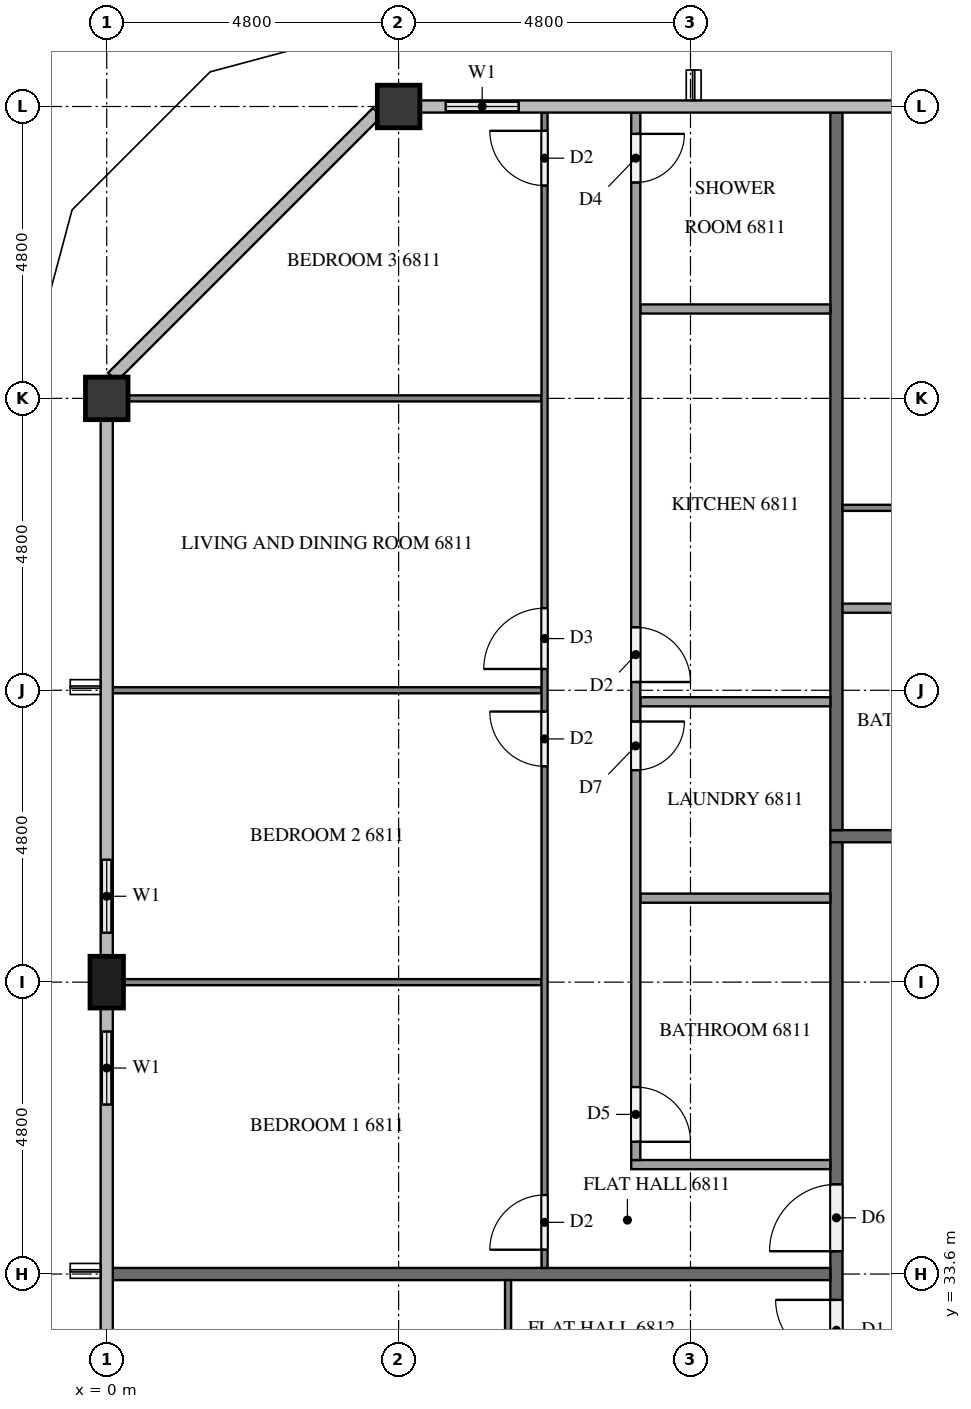
"""IFC4 building model, lengths in metres.
Left out: names, types, materials, properties, quantities, classifications, styles, units other than length and angle.
Written with IfcOpenShell. Run it as: python <this file> out.ifc"""

import sys

from ifc_helpers import new_model, si_unit, direction, frame, frame_2d, origin, origin_2d, place, context, subcontext, project, spatial, rectangle, extrude, element, fill, save


model = new_model("IFC4")
c1 = context("Model", 3, precision=1e-05, world=origin(), true_north=direction((0.0, 1.0)))
c2 = subcontext(c1, "Body", "Model", "MODEL_VIEW")
j1 = project(units=[si_unit("LENGTHUNIT", "METRE"), si_unit("PLANEANGLEUNIT", "RADIAN")], contexts=[c1])
p1 = place(None, origin())
s1 = spatial("IfcSite", under=j1, at=p1, CompositionType="ELEMENT")
p2 = place(p1, origin())
s2 = spatial("IfcBuilding", under=s1, at=p2, CompositionType="ELEMENT")
p3 = place(p2, frame((0.0, 0.0, 259.7)))
s3 = spatial("IfcBuildingStorey", under=s2, at=p3, CompositionType="ELEMENT", Elevation=259.7)
for number, where, z_axis, x_axis in (
    (1, (4.8, 52.8, 0.0), (0.0, 0.0, 1.0), (1.0, 0.0, 0.0)),
    (2, (0.0, 48.0, 0.0), (0.0, 0.0, 1.0), (1.0, 0.0, 0.0)),
):
    element("IfcColumn", number, at=place(p3, frame(where, z_axis=z_axis, x_axis=x_axis)), inside=s3, PredefinedType="COLUMN", context=c2, shape_type="SweptSolid", body=[
        extrude(rectangle(XDim=0.7, YDim=0.7, at=origin_2d()), origin(), (0.0, 0.0, 1.0), 3.1),
    ])
p4 = place(p3, frame((0.0, 38.4, 0.0), z_axis=(0.0, 0.0, 1.0), x_axis=(0.0, 1.0, 0.0)))
e3 = element("IfcColumn", 3, at=p4, inside=s3, PredefinedType="COLUMN", context=c2, shape_type="SweptSolid", body=[
    extrude(rectangle(XDim=0.85, YDim=0.55, at=origin_2d()), origin(), (0.0, 0.0, 1.0), 3.1),
])
p5 = place(p3, frame((7.2, 52.8, 0.0), z_axis=(0.0, 0.0, 1.0), x_axis=(-1.0, 0.0, 0.0)))
e4 = element("IfcWall", 4, at=p5, inside=s3, PredefinedType="SOLIDWALL", context=c2, shape_type="SweptSolid", body=[
    extrude(rectangle(XDim=2.05, YDim=0.15, at=frame_2d((1.025, 0.0))), origin(), (0.0, 0.0, 1.0), 3.1),
])
p6 = place(p5, frame((0.425, 0.0, 0.9)))
e5 = element("IfcOpeningElement", 5, at=p6, cuts=e4, PredefinedType="OPENING", context=c2, shape_type="SweptSolid", body=[
    extrude(rectangle(XDim=1.2, YDim=1.4, at=frame_2d((0.6, 0.7))), frame((0.0, 0.085, 0.0), z_axis=(0.0, -1.0, 0.0), x_axis=(1.0, 0.0, 0.0)), (0.0, 0.0, 1.0), 0.17),
])
p7 = place(p3, frame((0.0, 40.8, 0.0), z_axis=(0.0, 0.0, 1.0), x_axis=(0.0, -1.0, 0.0)))
e6 = element("IfcWall", 6, at=p7, inside=s3, PredefinedType="SOLIDWALL", context=c2, shape_type="SweptSolid", body=[
    extrude(rectangle(XDim=1.975, YDim=0.15, at=frame_2d((0.988, 0.0))), origin(), (0.0, 0.0, 1.0), 3.1),
])
p8 = place(p7, frame((0.387, 0.0, 0.9)))
e7 = element("IfcOpeningElement", 7, at=p8, cuts=e6, PredefinedType="OPENING", context=c2, shape_type="SweptSolid", body=[
    extrude(rectangle(XDim=1.2, YDim=1.4, at=frame_2d((0.6, 0.7))), frame((0.0, 0.085, 0.0), z_axis=(0.0, -1.0, 0.0), x_axis=(1.0, 0.0, 0.0)), (0.0, 0.0, 1.0), 0.17),
])
p9 = place(p3, frame((0.0, 37.975, 0.0), z_axis=(0.0, 0.0, 1.0), x_axis=(0.0, -1.0, 0.0)))
e8 = element("IfcWall", 8, at=p9, inside=s3, PredefinedType="SOLIDWALL", context=c2, shape_type="SweptSolid", body=[
    extrude(rectangle(XDim=1.975, YDim=0.15, at=frame_2d((0.988, 0.0))), origin(), (0.0, 0.0, 1.0), 3.1),
])
p10 = place(p9, frame((0.387, 0.0, 0.9)))
e9 = element("IfcOpeningElement", 9, at=p10, cuts=e8, PredefinedType="OPENING", context=c2, shape_type="SweptSolid", body=[
    extrude(rectangle(XDim=1.2, YDim=1.4, at=frame_2d((0.6, 0.7))), frame((0.0, 0.085, 0.0), z_axis=(0.0, -1.0, 0.0), x_axis=(1.0, 0.0, 0.0)), (0.0, 0.0, 1.0), 0.17),
])
p11 = place(p3, frame((11.9, 40.8, 0.0), z_axis=(0.0, 0.0, 1.0), x_axis=(1.0, 0.0, 0.0)))
e10 = element("IfcWall", 10, at=p11, inside=s3, PredefinedType="PARTITIONING", context=c2, shape_type="SweptSolid", body=[
    extrude(rectangle(XDim=38.6, YDim=0.2, at=frame_2d((19.3, 0.0))), origin(), (0.0, 0.0, 1.0), 3.1),
])
p12 = place(p11, frame((34.125, 0.0, 0.0)))
e11 = element("IfcOpeningElement", 11, at=p12, cuts=e10, PredefinedType="OPENING", context=c2, shape_type="SweptSolid", body=[
    extrude(rectangle(XDim=1.0, YDim=2.1, at=frame_2d((0.5, 1.05))), frame((0.0, 0.11, 0.0), z_axis=(0.0, -1.0, 0.0), x_axis=(1.0, 0.0, 0.0)), (0.0, 0.0, 1.0), 0.22),
])
p13 = place(p11, frame((24.525, 0.0, 0.0)))
e12 = element("IfcOpeningElement", 12, at=p13, cuts=e10, PredefinedType="OPENING", context=c2, shape_type="SweptSolid", body=[
    extrude(rectangle(XDim=1.0, YDim=2.1, at=frame_2d((0.5, 1.05))), frame((0.0, 0.11, 0.0), z_axis=(0.0, -1.0, 0.0), x_axis=(1.0, 0.0, 0.0)), (0.0, 0.0, 1.0), 0.22),
])
p14 = place(p11, frame((10.125, 0.0, 0.0)))
e13 = element("IfcOpeningElement", 13, at=p14, cuts=e10, PredefinedType="OPENING", context=c2, shape_type="SweptSolid", body=[
    extrude(rectangle(XDim=1.0, YDim=2.1, at=frame_2d((0.5, 1.05))), frame((0.0, 0.11, 0.0), z_axis=(0.0, -1.0, 0.0), x_axis=(1.0, 0.0, 0.0)), (0.0, 0.0, 1.0), 0.22),
])
p15 = place(p11, frame((8.275, 0.0, 0.0)))
e14 = element("IfcOpeningElement", 14, at=p15, cuts=e10, PredefinedType="OPENING", context=c2, shape_type="SweptSolid", body=[
    extrude(rectangle(XDim=1.0, YDim=2.1, at=frame_2d((0.5, 1.05))), frame((0.0, 0.11, 0.0), z_axis=(0.0, -1.0, 0.0), x_axis=(1.0, 0.0, 0.0)), (0.0, 0.0, 1.0), 0.22),
])
p16 = place(p3, frame((12.0, 12.1, 0.0), z_axis=(0.0, 0.0, 1.0), x_axis=(0.0, 1.0, 0.0)))
e15 = element("IfcWall", 15, at=p16, inside=s3, PredefinedType="PARTITIONING", context=c2, shape_type="SweptSolid", body=[
    extrude(rectangle(XDim=28.6, YDim=0.2, at=frame_2d((14.3, 0.0))), origin(), (0.0, 0.0, 1.0), 3.1),
])
p17 = place(p16, frame((21.875, 0.0, 0.0)))
e16 = element("IfcOpeningElement", 16, at=p17, cuts=e15, PredefinedType="OPENING", context=c2, shape_type="SweptSolid", body=[
    extrude(rectangle(XDim=1.1, YDim=2.1, at=frame_2d((0.55, 1.05))), frame((0.0, 0.11, 0.0), z_axis=(0.0, -1.0, 0.0), x_axis=(1.0, 0.0, 0.0)), (0.0, 0.0, 1.0), 0.22),
])
p18 = place(p16, frame((20.075, 0.0, 0.0)))
e17 = element("IfcOpeningElement", 17, at=p18, cuts=e15, PredefinedType="OPENING", context=c2, shape_type="SweptSolid", body=[
    extrude(rectangle(XDim=1.0, YDim=2.1, at=frame_2d((0.5, 1.05))), frame((0.0, 0.11, 0.0), z_axis=(0.0, -1.0, 0.0), x_axis=(1.0, 0.0, 0.0)), (0.0, 0.0, 1.0), 0.22),
])
p19 = place(p16, frame((5.675, 0.0, 0.0)))
e18 = element("IfcOpeningElement", 18, at=p19, cuts=e15, PredefinedType="OPENING", context=c2, shape_type="SweptSolid", body=[
    extrude(rectangle(XDim=1.0, YDim=2.1, at=frame_2d((0.5, 1.05))), frame((0.0, 0.11, 0.0), z_axis=(0.0, -1.0, 0.0), x_axis=(1.0, 0.0, 0.0)), (0.0, 0.0, 1.0), 0.22),
])
p20 = place(p3, frame((12.0, 52.7, 0.0), z_axis=(0.0, 0.0, 1.0), x_axis=(0.0, -1.0, 0.0)))
e19 = element("IfcWall", 19, at=p20, inside=s3, PredefinedType="PARTITIONING", context=c2, shape_type="SweptSolid", body=[
    extrude(rectangle(XDim=11.8, YDim=0.2, at=frame_2d((5.9, 0.0))), origin(), (0.0, 0.0, 1.0), 3.1),
])
p21 = place(p3, frame((0.1, 33.6, 0.0), z_axis=(0.0, 0.0, 1.0), x_axis=(1.0, 0.0, 0.0)))
e20 = element("IfcWall", 20, at=p21, inside=s3, PredefinedType="PARTITIONING", context=c2, shape_type="SweptSolid", body=[
    extrude(rectangle(XDim=11.8, YDim=0.2, at=frame_2d((5.9, 0.0))), origin(), (0.0, 0.0, 1.0), 3.1),
])
p22 = place(p3, frame((12.1, 46.2, 0.0), z_axis=(0.0, 0.0, 1.0), x_axis=(1.0, 0.0, 0.0)))
e21 = element("IfcWall", 21, at=p22, inside=s3, PredefinedType="PARTITIONING", context=c2, shape_type="SweptSolid", body=[
    extrude(rectangle(XDim=9.4, YDim=0.1, at=frame_2d((4.7, 0.0))), origin(), (0.0, 0.0, 1.0), 3.1),
])
p23 = place(p22, frame((5.05, 0.0, 0.0)))
e22 = element("IfcOpeningElement", 22, at=p23, cuts=e21, PredefinedType="OPENING", context=c2, shape_type="SweptSolid", body=[
    extrude(rectangle(XDim=1.0, YDim=2.1, at=frame_2d((0.5, 1.05))), frame((0.0, 0.06, 0.0), z_axis=(0.0, -1.0, 0.0), x_axis=(1.0, 0.0, 0.0)), (0.0, 0.0, 1.0), 0.12),
])
p24 = place(p22, frame((3.45, 0.0, 0.0)))
e23 = element("IfcOpeningElement", 23, at=p24, cuts=e21, PredefinedType="OPENING", context=c2, shape_type="SweptSolid", body=[
    extrude(rectangle(XDim=0.9, YDim=2.1, at=frame_2d((0.45, 1.05))), frame((0.0, 0.06, 0.0), z_axis=(0.0, -1.0, 0.0), x_axis=(1.0, 0.0, 0.0)), (0.0, 0.0, 1.0), 0.12),
])
p25 = place(p3, frame((19.725, 44.55, 0.0), z_axis=(0.0, 0.0, 1.0), x_axis=(-1.0, 0.0, 0.0)))
e24 = element("IfcWall", 24, at=p25, inside=s3, PredefinedType="PARTITIONING", context=c2, shape_type="SweptSolid", body=[
    extrude(rectangle(XDim=7.625, YDim=0.15, at=frame_2d((3.812, 0.0))), origin(), (0.0, 0.0, 1.0), 3.1),
])
p26 = place(p25, frame((3.35, 0.0, 0.0)))
e25 = element("IfcOpeningElement", 25, at=p26, cuts=e24, PredefinedType="OPENING", context=c2, shape_type="SweptSolid", body=[
    extrude(rectangle(XDim=0.9, YDim=2.1, at=frame_2d((0.45, 1.05))), frame((0.0, 0.085, 0.0), z_axis=(0.0, -1.0, 0.0), x_axis=(1.0, 0.0, 0.0)), (0.0, 0.0, 1.0), 0.17),
])
p27 = place(p25, frame((4.9, 0.0, 0.0)))
e26 = element("IfcOpeningElement", 26, at=p27, cuts=e24, PredefinedType="OPENING", context=c2, shape_type="SweptSolid", body=[
    extrude(rectangle(XDim=0.8, YDim=2.1, at=frame_2d((0.4, 1.05))), frame((0.0, 0.085, 0.0), z_axis=(0.0, -1.0, 0.0), x_axis=(1.0, 0.0, 0.0)), (0.0, 0.0, 1.0), 0.17),
])
p28 = place(p3, frame((7.15, 38.4, 0.0), z_axis=(0.0, 0.0, 1.0), x_axis=(-1.0, 0.0, 0.0)))
e27 = element("IfcWall", 27, at=p28, inside=s3, PredefinedType="PARTITIONING", context=c2, shape_type="SweptSolid", body=[
    extrude(rectangle(XDim=6.875, YDim=0.1, at=frame_2d((3.438, 0.0))), origin(), (0.0, 0.0, 1.0), 3.1),
])
p29 = place(p3, frame((7.15, 43.2, 0.0), z_axis=(0.0, 0.0, 1.0), x_axis=(-1.0, 0.0, 0.0)))
e28 = element("IfcWall", 28, at=p29, inside=s3, PredefinedType="PARTITIONING", context=c2, shape_type="SweptSolid", body=[
    extrude(rectangle(XDim=7.05, YDim=0.1, at=frame_2d((3.525, 0.0))), origin(), (0.0, 0.0, 1.0), 3.1),
])
p30 = place(p3, frame((7.15, 48.0, 0.0), z_axis=(0.0, 0.0, 1.0), x_axis=(-1.0, 0.0, 0.0)))
e29 = element("IfcWall", 29, at=p30, inside=s3, PredefinedType="PARTITIONING", context=c2, shape_type="SweptSolid", body=[
    extrude(rectangle(XDim=6.8, YDim=0.1, at=frame_2d((3.4, 0.0))), origin(), (0.0, 0.0, 1.0), 3.1),
])
p31 = place(p3, frame((7.2, 33.7, 0.0), z_axis=(0.0, 0.0, 1.0), x_axis=(0.0, 1.0, 0.0)))
e30 = element("IfcWall", 30, at=p31, inside=s3, PredefinedType="PARTITIONING", context=c2, shape_type="SweptSolid", body=[
    extrude(rectangle(XDim=19.0, YDim=0.1, at=frame_2d((9.5, 0.0))), origin(), (0.0, 0.0, 1.0), 3.1),
])
p32 = place(p31, frame((0.3, 0.0, 0.0)))
e31 = element("IfcOpeningElement", 31, at=p32, cuts=e30, PredefinedType="OPENING", context=c2, shape_type="SweptSolid", body=[
    extrude(rectangle(XDim=0.9, YDim=2.1, at=frame_2d((0.45, 1.05))), frame((0.0, 0.06, 0.0), z_axis=(0.0, -1.0, 0.0), x_axis=(1.0, 0.0, 0.0)), (0.0, 0.0, 1.0), 0.12),
])
p33 = place(p31, frame((8.25, 0.0, 0.0)))
e32 = element("IfcOpeningElement", 32, at=p33, cuts=e30, PredefinedType="OPENING", context=c2, shape_type="SweptSolid", body=[
    extrude(rectangle(XDim=0.9, YDim=2.1, at=frame_2d((0.45, 1.05))), frame((0.0, 0.06, 0.0), z_axis=(0.0, -1.0, 0.0), x_axis=(1.0, 0.0, 0.0)), (0.0, 0.0, 1.0), 0.12),
])
p34 = place(p31, frame((9.85, 0.0, 0.0)))
e33 = element("IfcOpeningElement", 33, at=p34, cuts=e30, PredefinedType="OPENING", context=c2, shape_type="SweptSolid", body=[
    extrude(rectangle(XDim=1.0, YDim=2.1, at=frame_2d((0.5, 1.05))), frame((0.0, 0.06, 0.0), z_axis=(0.0, -1.0, 0.0), x_axis=(1.0, 0.0, 0.0)), (0.0, 0.0, 1.0), 0.12),
])
p35 = place(p31, frame((17.8, 0.0, 0.0)))
e34 = element("IfcOpeningElement", 34, at=p35, cuts=e30, PredefinedType="OPENING", context=c2, shape_type="SweptSolid", body=[
    extrude(rectangle(XDim=0.9, YDim=2.1, at=frame_2d((0.45, 1.05))), frame((0.0, 0.06, 0.0), z_axis=(0.0, -1.0, 0.0), x_axis=(1.0, 0.0, 0.0)), (0.0, 0.0, 1.0), 0.12),
])
for number, where, z_axis, x_axis in (
    (35, (11.9, 39.781, 0.0), (0.0, 0.0, 1.0), (-1.0, 0.0, 0.0)),
    (36, (11.9, 43.011, 0.0), (0.0, 0.0, 1.0), (-1.0, 0.0, 0.0)),
    (37, (11.9, 49.47, 0.0), (0.0, 0.0, 1.0), (-1.0, 0.0, 0.0)),
):
    element("IfcWall", number, at=place(p3, frame(where, z_axis=z_axis, x_axis=x_axis)), inside=s3, PredefinedType="PARTITIONING", context=c2, shape_type="SweptSolid", body=[
        extrude(rectangle(XDim=3.125, YDim=0.15, at=frame_2d((1.562, 0.0))), origin(), (0.0, 0.0, 1.0), 3.1),
    ])
p36 = place(p3, frame((11.9, 35.4, 0.0), z_axis=(0.0, 0.0, 1.0), x_axis=(-1.0, 0.0, 0.0)))
e38 = element("IfcWall", 38, at=p36, inside=s3, PredefinedType="PARTITIONING", context=c2, shape_type="SweptSolid", body=[
    extrude(rectangle(XDim=3.275, YDim=0.15, at=frame_2d((1.637, 0.0))), origin(), (0.0, 0.0, 1.0), 3.1),
])
p37 = place(p3, frame((8.7, 52.7, 0.0), z_axis=(0.0, 0.0, 1.0), x_axis=(0.0, -1.0, 0.0)))
e39 = element("IfcWall", 39, at=p37, inside=s3, PredefinedType="PARTITIONING", context=c2, shape_type="SweptSolid", body=[
    extrude(rectangle(XDim=17.225, YDim=0.15, at=frame_2d((8.612, 0.0))), origin(), (0.0, 0.0, 1.0), 3.1),
])
p38 = place(p37, frame((16.025, 0.0, 0.0)))
e40 = element("IfcOpeningElement", 40, at=p38, cuts=e39, PredefinedType="OPENING", context=c2, shape_type="SweptSolid", body=[
    extrude(rectangle(XDim=0.9, YDim=2.1, at=frame_2d((0.45, 1.05))), frame((0.0, 0.085, 0.0), z_axis=(0.0, -1.0, 0.0), x_axis=(1.0, 0.0, 0.0)), (0.0, 0.0, 1.0), 0.17),
])
p39 = place(p37, frame((10.014, 0.0, 0.0)))
e41 = element("IfcOpeningElement", 41, at=p39, cuts=e39, PredefinedType="OPENING", context=c2, shape_type="SweptSolid", body=[
    extrude(rectangle(XDim=0.8, YDim=2.1, at=frame_2d((0.4, 1.05))), frame((0.0, 0.085, 0.0), z_axis=(0.0, -1.0, 0.0), x_axis=(1.0, 0.0, 0.0)), (0.0, 0.0, 1.0), 0.17),
])
p40 = place(p37, frame((8.464, 0.0, 0.0)))
e42 = element("IfcOpeningElement", 42, at=p40, cuts=e39, PredefinedType="OPENING", context=c2, shape_type="SweptSolid", body=[
    extrude(rectangle(XDim=0.9, YDim=2.1, at=frame_2d((0.45, 1.05))), frame((0.0, 0.085, 0.0), z_axis=(0.0, -1.0, 0.0), x_axis=(1.0, 0.0, 0.0)), (0.0, 0.0, 1.0), 0.17),
])
p41 = place(p37, frame((0.35, 0.0, 0.0)))
e43 = element("IfcOpeningElement", 43, at=p41, cuts=e39, PredefinedType="OPENING", context=c2, shape_type="SweptSolid", body=[
    extrude(rectangle(XDim=0.8, YDim=2.1, at=frame_2d((0.4, 1.05))), frame((0.0, 0.085, 0.0), z_axis=(0.0, -1.0, 0.0), x_axis=(1.0, 0.0, 0.0)), (0.0, 0.0, 1.0), 0.17),
])
p42 = place(p3, frame((6.6, 19.3, 0.0), z_axis=(0.0, 0.0, 1.0), x_axis=(0.0, 1.0, 0.0)))
e44 = element("IfcWall", 44, at=p42, inside=s3, PredefinedType="PARTITIONING", context=c2, shape_type="SweptSolid", body=[
    extrude(rectangle(XDim=14.2, YDim=0.1, at=frame_2d((7.1, 0.0))), origin(), (0.0, 0.0, 1.0), 3.1),
])
p43 = place(p42, frame((9.85, 0.0, 0.0)))
e45 = element("IfcOpeningElement", 45, at=p43, cuts=e44, PredefinedType="OPENING", context=c2, shape_type="SweptSolid", body=[
    extrude(rectangle(XDim=0.9, YDim=2.1, at=frame_2d((0.45, 1.05))), frame((0.0, 0.06, 0.0), z_axis=(0.0, -1.0, 0.0), x_axis=(1.0, 0.0, 0.0)), (0.0, 0.0, 1.0), 0.12),
])
p44 = place(p42, frame((8.25, 0.0, 0.0)))
e46 = element("IfcOpeningElement", 46, at=p44, cuts=e44, PredefinedType="OPENING", context=c2, shape_type="SweptSolid", body=[
    extrude(rectangle(XDim=0.9, YDim=2.1, at=frame_2d((0.45, 1.05))), frame((0.0, 0.06, 0.0), z_axis=(0.0, -1.0, 0.0), x_axis=(1.0, 0.0, 0.0)), (0.0, 0.0, 1.0), 0.12),
])
p45 = place(p42, frame((0.3, 0.0, 0.0)))
e47 = element("IfcOpeningElement", 47, at=p45, cuts=e44, PredefinedType="OPENING", context=c2, shape_type="SweptSolid", body=[
    extrude(rectangle(XDim=1.0, YDim=2.1, at=frame_2d((0.5, 1.05))), frame((0.0, 0.06, 0.0), z_axis=(0.0, -1.0, 0.0), x_axis=(1.0, 0.0, 0.0)), (0.0, 0.0, 1.0), 0.12),
])
p46 = place(p6, origin())
e48 = element("IfcWindow", 48, at=p46, inside=s3, PartitioningType="SINGLE_PANEL", PredefinedType="WINDOW", context=c2, shape_type="SweptSolid", body=[
    extrude(rectangle(XDim=1.2, YDim=1.4, at=frame_2d((0.6, 0.7))), frame((0.0, 0.03, 0.0), z_axis=(0.0, -1.0, 0.0), x_axis=(1.0, 0.0, 0.0)), (0.0, 0.0, 1.0), 0.06),
])
fill(e5, e48)
p47 = place(p8, origin())
e49 = element("IfcWindow", 49, at=p47, inside=s3, PartitioningType="SINGLE_PANEL", PredefinedType="WINDOW", context=c2, shape_type="SweptSolid", body=[
    extrude(rectangle(XDim=1.2, YDim=1.4, at=frame_2d((0.6, 0.7))), frame((0.0, 0.03, 0.0), z_axis=(0.0, -1.0, 0.0), x_axis=(1.0, 0.0, 0.0)), (0.0, 0.0, 1.0), 0.06),
])
fill(e7, e49)
p48 = place(p10, origin())
e50 = element("IfcWindow", 50, at=p48, inside=s3, PartitioningType="SINGLE_PANEL", PredefinedType="WINDOW", context=c2, shape_type="SweptSolid", body=[
    extrude(rectangle(XDim=1.2, YDim=1.4, at=frame_2d((0.6, 0.7))), frame((0.0, 0.03, 0.0), z_axis=(0.0, -1.0, 0.0), x_axis=(1.0, 0.0, 0.0)), (0.0, 0.0, 1.0), 0.06),
])
fill(e9, e50)
p49 = place(p17, origin())
e51 = element("IfcDoor", 51, at=p49, inside=s3, OperationType="SINGLE_SWING_LEFT", PredefinedType="DOOR", context=c2, shape_type="SweptSolid", body=[
    extrude(rectangle(XDim=1.1, YDim=2.1, at=frame_2d((0.55, 1.05))), frame((0.0, 0.025, 0.0), z_axis=(0.0, -1.0, 0.0), x_axis=(1.0, 0.0, 0.0)), (0.0, 0.0, 1.0), 0.05),
])
fill(e16, e51)
p50 = place(p18, origin())
e52 = element("IfcDoor", 52, at=p50, inside=s3, OperationType="SINGLE_SWING_RIGHT", PredefinedType="DOOR", context=c2, shape_type="SweptSolid", body=[
    extrude(rectangle(XDim=1.0, YDim=2.1, at=frame_2d((0.5, 1.05))), frame((0.0, 0.025, 0.0), z_axis=(0.0, -1.0, 0.0), x_axis=(1.0, 0.0, 0.0)), (0.0, 0.0, 1.0), 0.05),
])
fill(e17, e52)
p51 = place(p32, origin())
e53 = element("IfcDoor", 53, at=p51, inside=s3, OperationType="SINGLE_SWING_LEFT", PredefinedType="DOOR", context=c2, shape_type="SweptSolid", body=[
    extrude(rectangle(XDim=0.9, YDim=2.1, at=frame_2d((0.45, 1.05))), frame((0.0, 0.025, 0.0), z_axis=(0.0, -1.0, 0.0), x_axis=(1.0, 0.0, 0.0)), (0.0, 0.0, 1.0), 0.05),
])
fill(e31, e53)
p52 = place(p33, origin())
e54 = element("IfcDoor", 54, at=p52, inside=s3, OperationType="SINGLE_SWING_RIGHT", PredefinedType="DOOR", context=c2, shape_type="SweptSolid", body=[
    extrude(rectangle(XDim=0.9, YDim=2.1, at=frame_2d((0.45, 1.05))), frame((0.0, 0.025, 0.0), z_axis=(0.0, -1.0, 0.0), x_axis=(1.0, 0.0, 0.0)), (0.0, 0.0, 1.0), 0.05),
])
fill(e32, e54)
p53 = place(p34, origin())
e55 = element("IfcDoor", 55, at=p53, inside=s3, OperationType="SINGLE_SWING_LEFT", PredefinedType="DOOR", context=c2, shape_type="SweptSolid", body=[
    extrude(rectangle(XDim=1.0, YDim=2.1, at=frame_2d((0.5, 1.05))), frame((0.0, 0.025, 0.0), z_axis=(0.0, -1.0, 0.0), x_axis=(1.0, 0.0, 0.0)), (0.0, 0.0, 1.0), 0.05),
])
fill(e33, e55)
p54 = place(p35, origin())
e56 = element("IfcDoor", 56, at=p54, inside=s3, OperationType="SINGLE_SWING_RIGHT", PredefinedType="DOOR", context=c2, shape_type="SweptSolid", body=[
    extrude(rectangle(XDim=0.9, YDim=2.1, at=frame_2d((0.45, 1.05))), frame((0.0, 0.025, 0.0), z_axis=(0.0, -1.0, 0.0), x_axis=(1.0, 0.0, 0.0)), (0.0, 0.0, 1.0), 0.05),
])
fill(e34, e56)
p55 = place(p38, origin())
e57 = element("IfcDoor", 57, at=p55, inside=s3, OperationType="SINGLE_SWING_RIGHT", PredefinedType="DOOR", context=c2, shape_type="SweptSolid", body=[
    extrude(rectangle(XDim=0.9, YDim=2.1, at=frame_2d((0.45, 1.05))), frame((0.0, 0.025, 0.0), z_axis=(0.0, -1.0, 0.0), x_axis=(1.0, 0.0, 0.0)), (0.0, 0.0, 1.0), 0.05),
])
fill(e40, e57)
p56 = place(p39, origin())
e58 = element("IfcDoor", 58, at=p56, inside=s3, OperationType="SINGLE_SWING_LEFT", PredefinedType="DOOR", context=c2, shape_type="SweptSolid", body=[
    extrude(rectangle(XDim=0.8, YDim=2.1, at=frame_2d((0.4, 1.05))), frame((0.0, 0.025, 0.0), z_axis=(0.0, -1.0, 0.0), x_axis=(1.0, 0.0, 0.0)), (0.0, 0.0, 1.0), 0.05),
])
fill(e41, e58)
p57 = place(p40, origin())
e59 = element("IfcDoor", 59, at=p57, inside=s3, OperationType="SINGLE_SWING_RIGHT", PredefinedType="DOOR", context=c2, shape_type="SweptSolid", body=[
    extrude(rectangle(XDim=0.9, YDim=2.1, at=frame_2d((0.45, 1.05))), frame((0.0, 0.025, 0.0), z_axis=(0.0, -1.0, 0.0), x_axis=(1.0, 0.0, 0.0)), (0.0, 0.0, 1.0), 0.05),
])
fill(e42, e59)
p58 = place(p41, origin())
e60 = element("IfcDoor", 60, at=p58, inside=s3, OperationType="SINGLE_SWING_LEFT", PredefinedType="DOOR", context=c2, shape_type="SweptSolid", body=[
    extrude(rectangle(XDim=0.8, YDim=2.1, at=frame_2d((0.4, 1.05))), frame((0.0, 0.025, 0.0), z_axis=(0.0, -1.0, 0.0), x_axis=(1.0, 0.0, 0.0)), (0.0, 0.0, 1.0), 0.05),
])
fill(e43, e60)
save(model, sys.argv[1])
